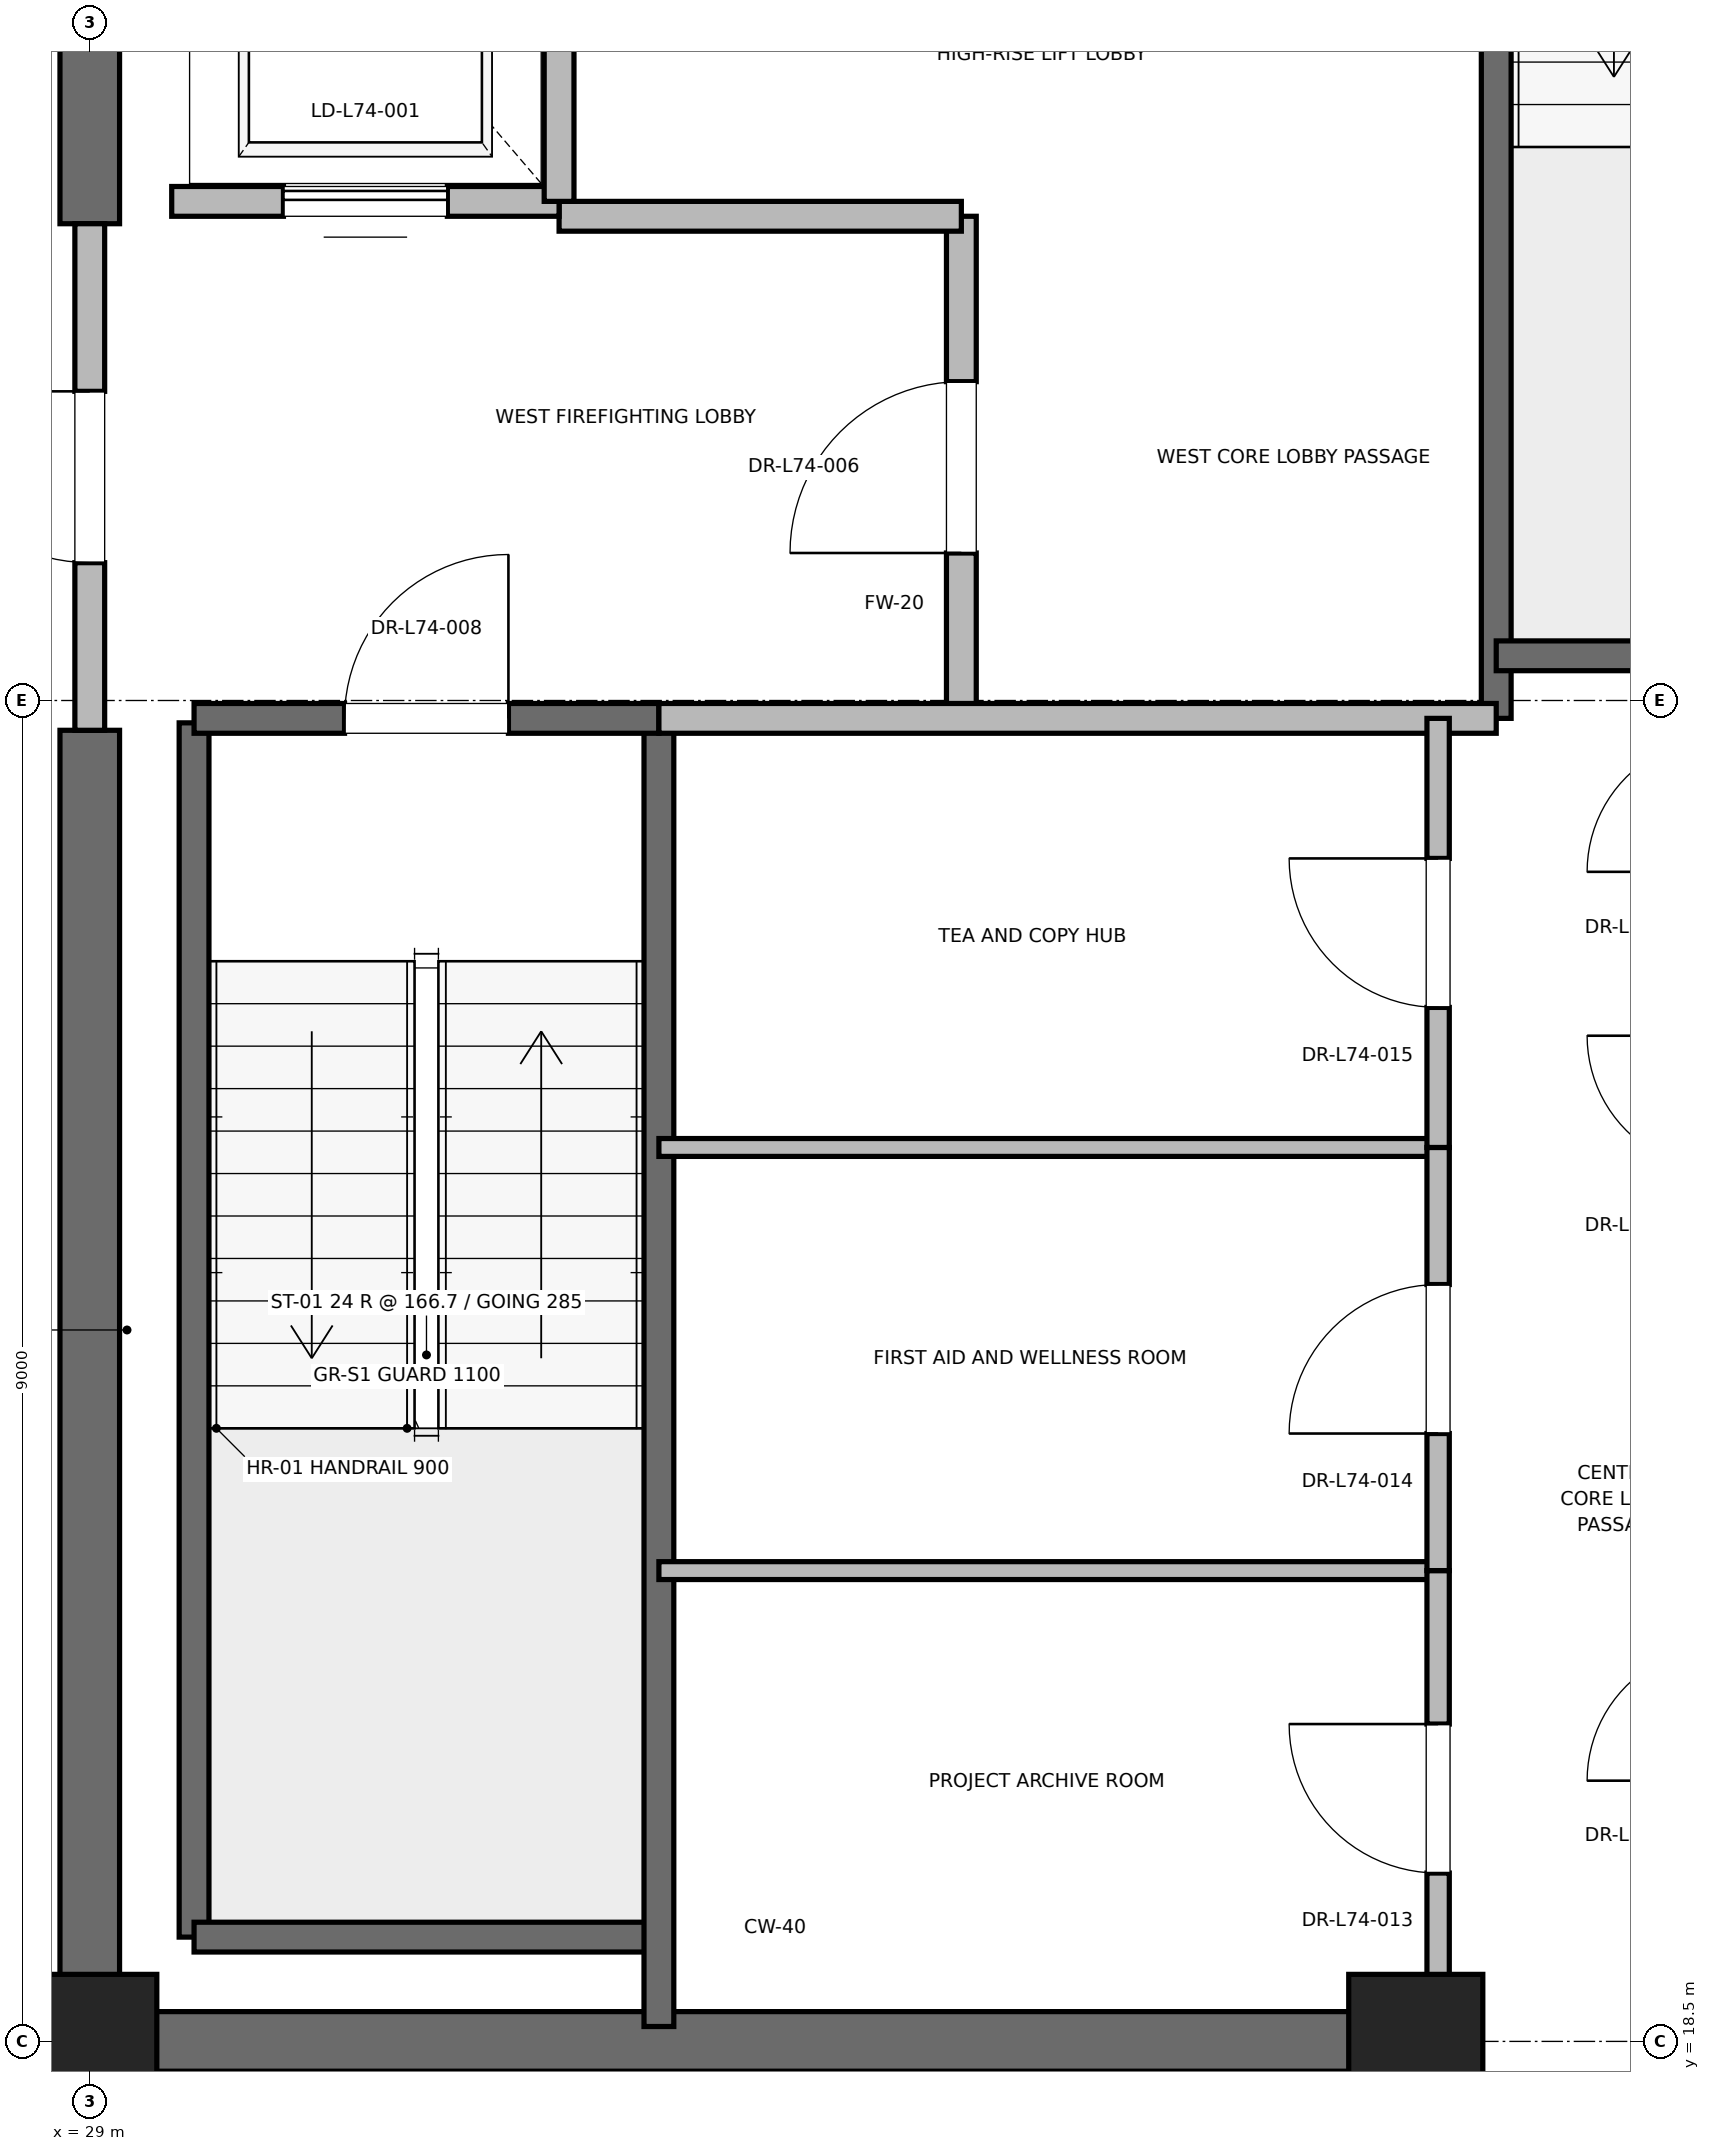
"""IFC4 building model, lengths in metres.
Left out: names, types, materials, properties, quantities, classifications, styles, units other than length and angle.
Written with IfcOpenShell. Run it as: python <this file> out.ifc"""

import sys

from ifc_helpers import new_model, si_unit, direction, frame, frame_2d, origin, origin_2d, place, context, subcontext, project, spatial, rectangle, extrude, element, fill, save


model = new_model("IFC4")
c1 = context("Model", 3, precision=1e-05, world=origin(), true_north=direction((0.0, 1.0)))
c2 = subcontext(c1, "Body", "Model", "MODEL_VIEW")
j1 = project(units=[si_unit("LENGTHUNIT", "METRE"), si_unit("PLANEANGLEUNIT", "RADIAN")], contexts=[c1])
p1 = place(None, origin())
s1 = spatial("IfcSite", under=j1, at=p1, CompositionType="ELEMENT")
p2 = place(p1, origin())
s2 = spatial("IfcBuilding", under=s1, at=p2, CompositionType="ELEMENT")
p3 = place(p2, frame((0.0, 0.0, 318.8)))
s3 = spatial("IfcBuildingStorey", under=s2, at=p3, CompositionType="ELEMENT", Elevation=318.8)
for number, where, z_axis, x_axis in (
    (1, (29.0, 18.5, 0.0), (0.0, 0.0, 1.0), (1.0, 0.0, 0.0)),
    (2, (37.9, 18.5, 0.0), (0.0, 0.0, 1.0), (1.0, 0.0, 0.0)),
):
    element("IfcColumn", number, at=place(p3, frame(where, z_axis=z_axis, x_axis=x_axis)), inside=s3, PredefinedType="PILASTER", context=c2, shape_type="SweptSolid", body=[
        extrude(rectangle(XDim=0.9, YDim=0.9, at=origin_2d()), origin(), (0.0, 0.0, 1.0), 4.0),
    ])
p4 = place(p3, frame((29.0, 18.5, 0.0), z_axis=(0.0, 0.0, 1.0), x_axis=(1.0, 0.0, 0.0)))
e3 = element("IfcWall", 3, at=p4, inside=s3, PredefinedType="SHEAR", context=c2, shape_type="SweptSolid", body=[
    extrude(rectangle(XDim=9.2, YDim=0.4, at=frame_2d((4.6, 0.0))), origin(), (0.0, 0.0, 1.0), 3.785),
])
p5 = place(p3, frame((29.0, 18.5, 0.0), z_axis=(0.0, 0.0, 1.0), x_axis=(0.0, 1.0, 0.0)))
e4 = element("IfcWall", 4, at=p5, inside=s3, PredefinedType="SHEAR", context=c2, shape_type="SweptSolid", body=[
    extrude(rectangle(XDim=8.8, YDim=0.4, at=frame_2d((4.4, 0.0))), origin(), (0.0, 0.0, 1.0), 3.785),
])
p6 = place(p3, frame((29.0, 30.7, 0.0), z_axis=(0.0, 0.0, 1.0), x_axis=(0.0, 1.0, 0.0)))
e5 = element("IfcWall", 5, at=p6, inside=s3, PredefinedType="SHEAR", context=c2, shape_type="SweptSolid", body=[
    extrude(rectangle(XDim=5.8, YDim=0.4, at=frame_2d((2.9, 0.0))), origin(), (0.0, 0.0, 1.0), 3.785),
])
p7 = place(p3, frame((29.7, 19.2, 0.0), z_axis=(0.0, 0.0, 1.0), x_axis=(0.0, 1.0, 0.0)))
e6 = element("IfcWall", 6, at=p7, inside=s3, PredefinedType="SOLIDWALL", context=c2, shape_type="SweptSolid", body=[
    extrude(rectangle(XDim=8.15, YDim=0.2, at=frame_2d((4.075, 0.0))), origin(), (0.0, 0.0, 1.0), 3.785),
])
p8 = place(p3, frame((29.7, 19.2, 0.0), z_axis=(0.0, 0.0, 1.0), x_axis=(1.0, 0.0, 0.0)))
e7 = element("IfcWall", 7, at=p8, inside=s3, PredefinedType="SOLIDWALL", context=c2, shape_type="SweptSolid", body=[
    extrude(rectangle(XDim=3.12, YDim=0.2, at=frame_2d((1.56, 0.0))), origin(), (0.0, 0.0, 1.0), 3.785),
])
p9 = place(p3, frame((32.82, 18.6, 0.0), z_axis=(0.0, 0.0, 1.0), x_axis=(0.0, 1.0, 0.0)))
e8 = element("IfcWall", 8, at=p9, inside=s3, PredefinedType="SOLIDWALL", context=c2, shape_type="SweptSolid", body=[
    extrude(rectangle(XDim=8.78, YDim=0.2, at=frame_2d((4.39, 0.0))), origin(), (0.0, 0.0, 1.0), 3.785),
])
p10 = place(p3, frame((29.7, 27.38, 0.0), z_axis=(0.0, 0.0, 1.0), x_axis=(1.0, 0.0, 0.0)))
e9 = element("IfcWall", 9, at=p10, inside=s3, PredefinedType="SOLIDWALL", context=c2, shape_type="SweptSolid", body=[
    extrude(rectangle(XDim=3.12, YDim=0.2, at=frame_2d((1.56, 0.0))), origin(), (0.0, 0.0, 1.0), 3.785),
])
p11 = place(p10, frame((1.01, 0.0, 0.0)))
e10 = element("IfcOpeningElement", 10, at=p11, cuts=e9, PredefinedType="OPENING", context=c2, shape_type="SweptSolid", body=[
    extrude(rectangle(XDim=1.1, YDim=2.15, at=frame_2d((0.55, 1.075))), frame((0.0, 0.1, 0.0), z_axis=(0.0, -1.0, 0.0), x_axis=(1.0, 0.0, 0.0)), (0.0, 0.0, 1.0), 0.2),
])
p12 = place(p3, frame((38.44, 27.38, 0.0), z_axis=(0.0, 0.0, 1.0), x_axis=(0.0, 1.0, 0.0)))
e11 = element("IfcWall", 11, at=p12, inside=s3, PredefinedType="SOLIDWALL", context=c2, shape_type="SweptSolid", body=[
    extrude(rectangle(XDim=8.87, YDim=0.2, at=frame_2d((4.435, 0.0))), origin(), (0.0, 0.0, 1.0), 3.785),
])
p13 = place(p3, frame((38.44, 27.8, 0.0), z_axis=(0.0, 0.0, 1.0), x_axis=(1.0, 0.0, 0.0)))
e12 = element("IfcWall", 12, at=p13, inside=s3, PredefinedType="SOLIDWALL", context=c2, shape_type="SweptSolid", body=[
    extrude(rectangle(XDim=3.32, YDim=0.2, at=frame_2d((1.66, 0.0))), origin(), (0.0, 0.0, 1.0), 3.785),
])
p14 = place(p3, frame((34.85, 27.38, 0.0), z_axis=(0.0, 0.0, 1.0), x_axis=(0.0, 1.0, 0.0)))
e13 = element("IfcWall", 13, at=p14, inside=s3, PredefinedType="PARTITIONING", context=c2, shape_type="SweptSolid", body=[
    extrude(rectangle(XDim=3.37, YDim=0.2, at=frame_2d((1.685, 0.0))), origin(), (0.0, 0.0, 1.0), 3.785),
])
p15 = place(p14, frame((1.11, 0.0, 0.0)))
e14 = element("IfcOpeningElement", 14, at=p15, cuts=e13, PredefinedType="OPENING", context=c2, shape_type="SweptSolid", body=[
    extrude(rectangle(XDim=1.15, YDim=2.2, at=frame_2d((0.575, 1.1))), frame((0.0, 0.1, 0.0), z_axis=(0.0, -1.0, 0.0), x_axis=(1.0, 0.0, 0.0)), (0.0, 0.0, 1.0), 0.2),
])
p16 = place(p3, frame((29.0, 27.3, 0.0), z_axis=(0.0, 0.0, 1.0), x_axis=(0.0, 1.0, 0.0)))
e15 = element("IfcWall", 15, at=p16, inside=s3, PredefinedType="PARTITIONING", context=c2, shape_type="SweptSolid", body=[
    extrude(rectangle(XDim=3.4, YDim=0.2, at=frame_2d((1.7, 0.0))), origin(), (0.0, 0.0, 1.0), 2.865),
])
p17 = place(p16, frame((1.125, 0.0, 0.0)))
e16 = element("IfcOpeningElement", 16, at=p17, cuts=e15, PredefinedType="OPENING", context=c2, shape_type="SweptSolid", body=[
    extrude(rectangle(XDim=1.15, YDim=2.2, at=frame_2d((0.575, 1.1))), frame((0.0, 0.1, 0.0), z_axis=(0.0, -1.0, 0.0), x_axis=(1.0, 0.0, 0.0)), (0.0, 0.0, 1.0), 0.2),
])
p18 = place(p3, frame((32.82, 27.38, 0.0), z_axis=(0.0, 0.0, 1.0), x_axis=(1.0, 0.0, 0.0)))
e17 = element("IfcWall", 17, at=p18, inside=s3, PredefinedType="PARTITIONING", context=c2, shape_type="SweptSolid", body=[
    extrude(rectangle(XDim=5.62, YDim=0.2, at=frame_2d((2.81, 0.0))), origin(), (0.0, 0.0, 1.0), 3.785),
])
p19 = place(p3, frame((32.15, 30.75, 0.0), z_axis=(0.0, 0.0, 1.0), x_axis=(1.0, 0.0, 0.0)))
e18 = element("IfcWall", 18, at=p19, inside=s3, PredefinedType="PARTITIONING", context=c2, shape_type="SweptSolid", body=[
    extrude(rectangle(XDim=2.7, YDim=0.2, at=frame_2d((1.35, 0.0))), origin(), (0.0, 0.0, 1.0), 3.785),
])
p20 = place(p3, frame((29.55, 30.85, 0.0), z_axis=(0.0, 0.0, 1.0), x_axis=(1.0, 0.0, 0.0)))
e19 = element("IfcWall", 19, at=p20, inside=s3, PredefinedType="SOLIDWALL", context=c2, shape_type="SweptSolid", body=[
    extrude(rectangle(XDim=2.6, YDim=0.2, at=frame_2d((1.3, 0.0))), origin(), (0.0, 0.0, 1.0), 2.865),
])
p21 = place(p20, frame((0.75, 0.0, 0.0)))
e20 = element("IfcOpeningElement", 20, at=p21, cuts=e19, PredefinedType="OPENING", context=c2, shape_type="SweptSolid", body=[
    extrude(rectangle(XDim=1.1, YDim=2.2, at=frame_2d((0.55, 1.1))), frame((0.0, 0.1, 0.0), z_axis=(0.0, -1.0, 0.0), x_axis=(1.0, 0.0, 0.0)), (0.0, 0.0, 1.0), 0.2),
])
p22 = place(p3, frame((32.15, 30.85, 0.0), z_axis=(0.0, 0.0, 1.0), x_axis=(0.0, 1.0, 0.0)))
e21 = element("IfcWall", 21, at=p22, inside=s3, PredefinedType="SOLIDWALL", context=c2, shape_type="SweptSolid", body=[
    extrude(rectangle(XDim=3.0, YDim=0.2, at=frame_2d((1.5, 0.0))), origin(), (0.0, 0.0, 1.0), 3.785),
])
for number, where, z_axis, x_axis in (
    (22, (32.82, 21.66, 0.0), (0.0, 0.0, 1.0), (1.0, 0.0, 0.0)),
    (23, (32.82, 24.5, 0.0), (0.0, 0.0, 1.0), (1.0, 0.0, 0.0)),
):
    element("IfcWall", number, at=place(p3, frame(where, z_axis=z_axis, x_axis=x_axis)), inside=s3, PredefinedType="PARTITIONING", context=c2, shape_type="SweptSolid", body=[
        extrude(rectangle(XDim=5.23, YDim=0.12, at=frame_2d((2.615, 0.0))), origin(), (0.0, 0.0, 1.0), 2.85),
    ])
p23 = place(p3, frame((38.05, 18.6, 0.0), z_axis=(0.0, 0.0, 1.0), x_axis=(0.0, 1.0, 0.0)))
e24 = element("IfcWall", 24, at=p23, inside=s3, PredefinedType="PARTITIONING", context=c2, shape_type="SweptSolid", body=[
    extrude(rectangle(XDim=3.06, YDim=0.15, at=frame_2d((1.53, 0.0))), origin(), (0.0, 0.0, 1.0), 2.85),
])
p24 = place(p23, frame((1.03, 0.0, 0.0)))
e25 = element("IfcOpeningElement", 25, at=p24, cuts=e24, PredefinedType="OPENING", context=c2, shape_type="SweptSolid", body=[
    extrude(rectangle(XDim=1.0, YDim=2.15, at=frame_2d((0.5, 1.075))), frame((0.0, 0.075, 0.0), z_axis=(0.0, -1.0, 0.0), x_axis=(1.0, 0.0, 0.0)), (0.0, 0.0, 1.0), 0.15),
])
p25 = place(p3, frame((38.05, 21.66, 0.0), z_axis=(0.0, 0.0, 1.0), x_axis=(0.0, 1.0, 0.0)))
e26 = element("IfcWall", 26, at=p25, inside=s3, PredefinedType="PARTITIONING", context=c2, shape_type="SweptSolid", body=[
    extrude(rectangle(XDim=2.84, YDim=0.15, at=frame_2d((1.42, 0.0))), origin(), (0.0, 0.0, 1.0), 2.85),
])
p26 = place(p25, frame((0.92, 0.0, 0.0)))
e27 = element("IfcOpeningElement", 27, at=p26, cuts=e26, PredefinedType="OPENING", context=c2, shape_type="SweptSolid", body=[
    extrude(rectangle(XDim=1.0, YDim=2.15, at=frame_2d((0.5, 1.075))), frame((0.0, 0.075, 0.0), z_axis=(0.0, -1.0, 0.0), x_axis=(1.0, 0.0, 0.0)), (0.0, 0.0, 1.0), 0.15),
])
p27 = place(p3, frame((38.05, 24.5, 0.0), z_axis=(0.0, 0.0, 1.0), x_axis=(0.0, 1.0, 0.0)))
e28 = element("IfcWall", 28, at=p27, inside=s3, PredefinedType="PARTITIONING", context=c2, shape_type="SweptSolid", body=[
    extrude(rectangle(XDim=2.88, YDim=0.15, at=frame_2d((1.44, 0.0))), origin(), (0.0, 0.0, 1.0), 2.85),
])
p28 = place(p27, frame((0.94, 0.0, 0.0)))
e29 = element("IfcOpeningElement", 29, at=p28, cuts=e28, PredefinedType="OPENING", context=c2, shape_type="SweptSolid", body=[
    extrude(rectangle(XDim=1.0, YDim=2.15, at=frame_2d((0.5, 1.075))), frame((0.0, 0.075, 0.0), z_axis=(0.0, -1.0, 0.0), x_axis=(1.0, 0.0, 0.0)), (0.0, 0.0, 1.0), 0.15),
])
p29 = place(p11, origin())
e30 = element("IfcDoor", 30, at=p29, inside=s3, OperationType="SINGLE_SWING_RIGHT", PredefinedType="DOOR", context=c2, shape_type="SweptSolid", body=[
    extrude(rectangle(XDim=1.1, YDim=2.15, at=frame_2d((0.55, 1.075))), frame((0.0, 0.025, 0.0), z_axis=(0.0, -1.0, 0.0), x_axis=(1.0, 0.0, 0.0)), (0.0, 0.0, 1.0), 0.05),
])
fill(e10, e30)
p30 = place(p15, origin())
e31 = element("IfcDoor", 31, at=p30, inside=s3, OperationType="SINGLE_SWING_LEFT", PredefinedType="DOOR", context=c2, shape_type="SweptSolid", body=[
    extrude(rectangle(XDim=1.15, YDim=2.2, at=frame_2d((0.575, 1.1))), frame((0.0, 0.025, 0.0), z_axis=(0.0, -1.0, 0.0), x_axis=(1.0, 0.0, 0.0)), (0.0, 0.0, 1.0), 0.05),
])
fill(e14, e31)
p31 = place(p17, origin())
e32 = element("IfcDoor", 32, at=p31, inside=s3, OperationType="SINGLE_SWING_RIGHT", PredefinedType="DOOR", context=c2, shape_type="SweptSolid", body=[
    extrude(rectangle(XDim=1.15, YDim=2.2, at=frame_2d((0.575, 1.1))), frame((0.0, 0.025, 0.0), z_axis=(0.0, -1.0, 0.0), x_axis=(1.0, 0.0, 0.0)), (0.0, 0.0, 1.0), 0.05),
])
fill(e16, e32)
p32 = place(p21, origin())
e33 = element("IfcDoor", 33, at=p32, inside=s3, OperationType="SLIDING_TO_RIGHT", PredefinedType="DOOR", context=c2, shape_type="SweptSolid", body=[
    extrude(rectangle(XDim=1.1, YDim=2.2, at=frame_2d((0.55, 1.1))), frame((0.0, 0.025, 0.0), z_axis=(0.0, -1.0, 0.0), x_axis=(1.0, 0.0, 0.0)), (0.0, 0.0, 1.0), 0.05),
])
fill(e20, e33)
p33 = place(p24, origin())
e34 = element("IfcDoor", 34, at=p33, inside=s3, OperationType="SINGLE_SWING_RIGHT", PredefinedType="DOOR", context=c2, shape_type="SweptSolid", body=[
    extrude(rectangle(XDim=1.0, YDim=2.15, at=frame_2d((0.5, 1.075))), frame((0.0, 0.025, 0.0), z_axis=(0.0, -1.0, 0.0), x_axis=(1.0, 0.0, 0.0)), (0.0, 0.0, 1.0), 0.05),
])
fill(e25, e34)
p34 = place(p26, origin())
e35 = element("IfcDoor", 35, at=p34, inside=s3, OperationType="SINGLE_SWING_LEFT", PredefinedType="DOOR", context=c2, shape_type="SweptSolid", body=[
    extrude(rectangle(XDim=1.0, YDim=2.15, at=frame_2d((0.5, 1.075))), frame((0.0, 0.025, 0.0), z_axis=(0.0, -1.0, 0.0), x_axis=(1.0, 0.0, 0.0)), (0.0, 0.0, 1.0), 0.05),
])
fill(e27, e35)
p35 = place(p28, origin())
e36 = element("IfcDoor", 36, at=p35, inside=s3, OperationType="SINGLE_SWING_RIGHT", PredefinedType="DOOR", context=c2, shape_type="SweptSolid", body=[
    extrude(rectangle(XDim=1.0, YDim=2.15, at=frame_2d((0.5, 1.075))), frame((0.0, 0.025, 0.0), z_axis=(0.0, -1.0, 0.0), x_axis=(1.0, 0.0, 0.0)), (0.0, 0.0, 1.0), 0.05),
])
fill(e29, e36)
save(model, sys.argv[1])
